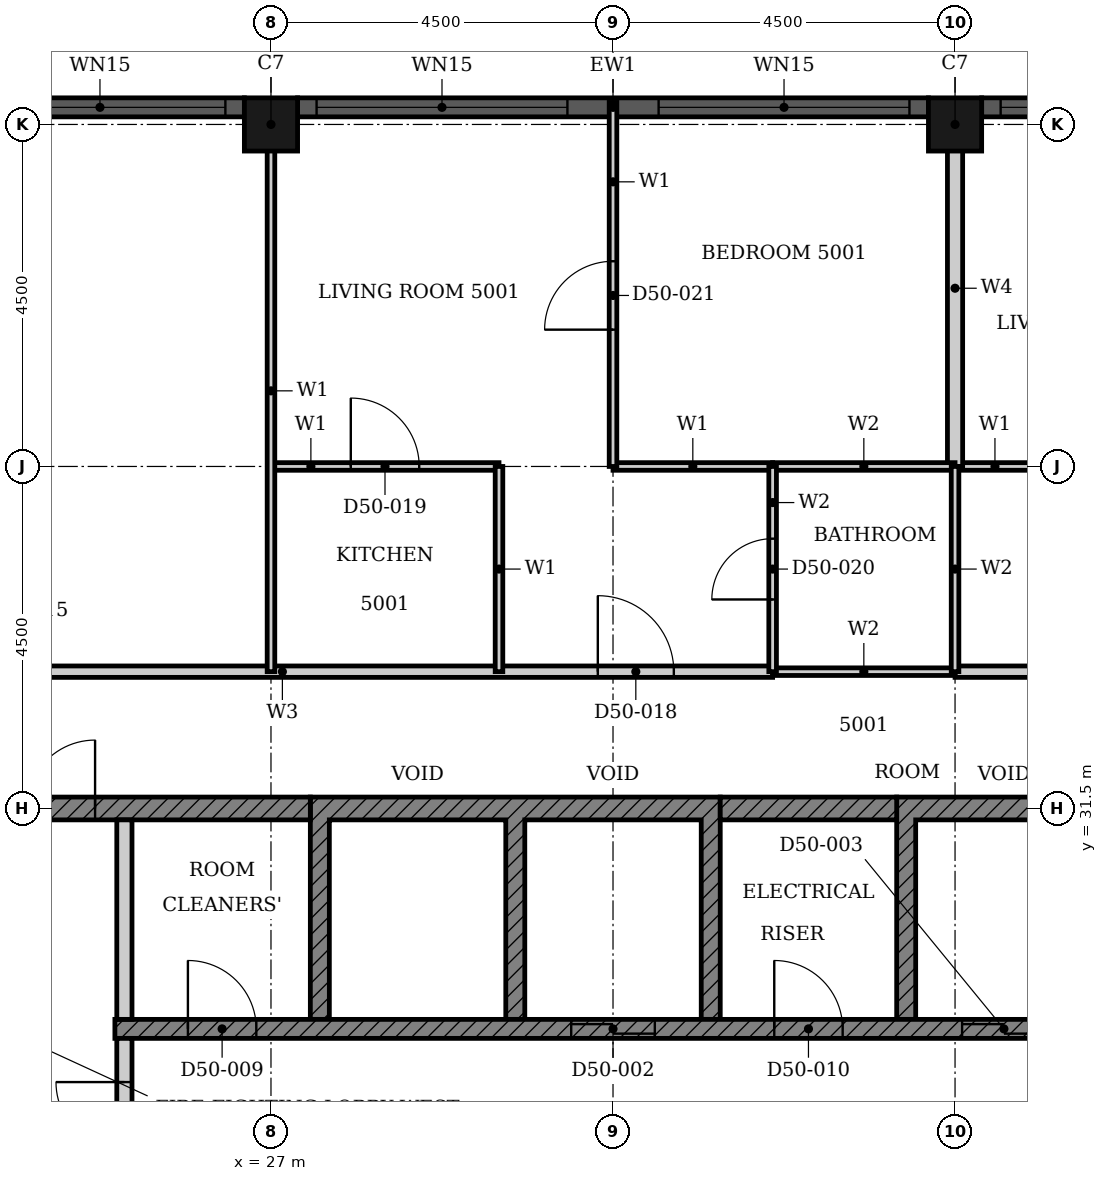
"""IFC4 building model, lengths in metres.
Left out: names, types, materials, properties, quantities, classifications, styles, units other than length and angle.
Written with IfcOpenShell. Run it as: python <this file> out.ifc"""

import sys

from ifc_helpers import new_model, si_unit, direction, frame, frame_2d, origin, origin_2d, place, context, subcontext, project, spatial, polyline, rectangle, hollow_rectangle, outline, extrude, element, fill, save


model = new_model("IFC4")
c1 = context("Model", 3, precision=1e-05, world=origin(), true_north=direction((0.0, 1.0)))
c2 = subcontext(c1, "Body", "Model", "MODEL_VIEW")
j1 = project(units=[si_unit("LENGTHUNIT", "METRE"), si_unit("PLANEANGLEUNIT", "RADIAN")], contexts=[c1])
p1 = place(None, origin())
s1 = spatial("IfcSite", under=j1, at=p1, CompositionType="ELEMENT")
p2 = place(p1, origin())
s2 = spatial("IfcBuilding", under=s1, at=p2, CompositionType="ELEMENT")
p3 = place(p2, frame((0.0, 0.0, 199.8)))
s3 = spatial("IfcBuildingStorey", under=s2, at=p3, CompositionType="ELEMENT", Elevation=199.8)
for number, where, z_axis, x_axis in (
    (1, (36.0, 40.5, 0.0), (0.0, 0.0, 1.0), (1.0, 0.0, 0.0)),
    (2, (27.0, 40.5, 0.0), (0.0, 0.0, 1.0), (1.0, 0.0, 0.0)),
):
    element("IfcColumn", number, at=place(p3, frame(where, z_axis=z_axis, x_axis=x_axis)), inside=s3, PredefinedType="COLUMN", context=c2, shape_type="SweptSolid", body=[
        extrude(hollow_rectangle(XDim=0.7, YDim=0.7, WallThickness=0.022, at=origin_2d()), origin(), (0.0, 0.0, 1.0), 3.7),
    ])
p4 = place(p3, frame((44.65, 40.725, 0.0), z_axis=(0.0, 0.0, 1.0), x_axis=(-1.0, 0.0, 0.0)))
e3 = element("IfcWall", 3, at=p4, inside=s3, PredefinedType="SOLIDWALL", context=c2, shape_type="SweptSolid", body=[
    extrude(rectangle(XDim=8.3, YDim=0.25, at=frame_2d((4.15, 0.0))), origin(), (0.0, 0.0, 1.0), 3.7),
])
p5 = place(p4, frame((0.25, 0.0, 0.45)))
e4 = element("IfcOpeningElement", 4, at=p5, cuts=e3, PredefinedType="OPENING", context=c2, shape_type="SweptSolid", body=[
    extrude(rectangle(XDim=3.3, YDim=2.3, at=frame_2d((1.65, 1.15))), frame((0.0, 0.135, 0.0), z_axis=(0.0, -1.0, 0.0), x_axis=(1.0, 0.0, 0.0)), (0.0, 0.0, 1.0), 0.27),
])
p6 = place(p4, frame((4.75, 0.0, 0.45)))
e5 = element("IfcOpeningElement", 5, at=p6, cuts=e3, PredefinedType="OPENING", context=c2, shape_type="SweptSolid", body=[
    extrude(rectangle(XDim=3.3, YDim=2.3, at=frame_2d((1.65, 1.15))), frame((0.0, 0.135, 0.0), z_axis=(0.0, -1.0, 0.0), x_axis=(1.0, 0.0, 0.0)), (0.0, 0.0, 1.0), 0.27),
])
p7 = place(p3, frame((35.65, 40.725, 0.0), z_axis=(0.0, 0.0, 1.0), x_axis=(-1.0, 0.0, 0.0)))
e6 = element("IfcWall", 6, at=p7, inside=s3, PredefinedType="SOLIDWALL", context=c2, shape_type="SweptSolid", body=[
    extrude(rectangle(XDim=8.3, YDim=0.25, at=frame_2d((4.15, 0.0))), origin(), (0.0, 0.0, 1.0), 3.7),
])
p8 = place(p7, frame((0.25, 0.0, 0.45)))
e7 = element("IfcOpeningElement", 7, at=p8, cuts=e6, PredefinedType="OPENING", context=c2, shape_type="SweptSolid", body=[
    extrude(rectangle(XDim=3.3, YDim=2.3, at=frame_2d((1.65, 1.15))), frame((0.0, 0.135, 0.0), z_axis=(0.0, -1.0, 0.0), x_axis=(1.0, 0.0, 0.0)), (0.0, 0.0, 1.0), 0.27),
])
p9 = place(p7, frame((4.75, 0.0, 0.45)))
e8 = element("IfcOpeningElement", 8, at=p9, cuts=e6, PredefinedType="OPENING", context=c2, shape_type="SweptSolid", body=[
    extrude(rectangle(XDim=3.3, YDim=2.3, at=frame_2d((1.65, 1.15))), frame((0.0, 0.135, 0.0), z_axis=(0.0, -1.0, 0.0), x_axis=(1.0, 0.0, 0.0)), (0.0, 0.0, 1.0), 0.27),
])
p10 = place(p3, frame((26.65, 40.725, 0.0), z_axis=(0.0, 0.0, 1.0), x_axis=(-1.0, 0.0, 0.0)))
e9 = element("IfcWall", 9, at=p10, inside=s3, PredefinedType="SOLIDWALL", context=c2, shape_type="SweptSolid", body=[
    extrude(rectangle(XDim=8.3, YDim=0.25, at=frame_2d((4.15, 0.0))), origin(), (0.0, 0.0, 1.0), 3.7),
])
p11 = place(p10, frame((0.25, 0.0, 0.45)))
e10 = element("IfcOpeningElement", 10, at=p11, cuts=e9, PredefinedType="OPENING", context=c2, shape_type="SweptSolid", body=[
    extrude(rectangle(XDim=3.3, YDim=2.3, at=frame_2d((1.65, 1.15))), frame((0.0, 0.135, 0.0), z_axis=(0.0, -1.0, 0.0), x_axis=(1.0, 0.0, 0.0)), (0.0, 0.0, 1.0), 0.27),
])
p12 = place(p10, frame((4.75, 0.0, 0.45)))
e11 = element("IfcOpeningElement", 11, at=p12, cuts=e9, PredefinedType="OPENING", context=c2, shape_type="SweptSolid", body=[
    extrude(rectangle(XDim=3.3, YDim=2.3, at=frame_2d((1.65, 1.15))), frame((0.0, 0.135, 0.0), z_axis=(0.0, -1.0, 0.0), x_axis=(1.0, 0.0, 0.0)), (0.0, 0.0, 1.0), 0.27),
])
p13 = place(p3, origin())
e12 = element("IfcWall", 12, at=p13, inside=s3, PredefinedType="SHEAR", context=c2, shape_type="SweptSolid", body=[
    extrude(outline(polyline([(27.518, 28.725), (27.768, 28.725), (27.768, 31.35), (30.089, 31.35), (30.089, 28.725), (30.339, 28.725), (30.339, 31.35), (32.661, 31.35), (32.661, 28.725), (32.911, 28.725), (32.911, 31.65), (27.518, 31.65), (27.518, 28.725)])), origin(), (0.0, 0.0, 1.0), 3.4),
])
p14 = place(p3, origin())
e13 = element("IfcWall", 13, at=p14, inside=s3, PredefinedType="SHEAR", context=c2, shape_type="SweptSolid", body=[
    extrude(outline(polyline([(35.232, 28.725), (35.482, 28.725), (35.482, 31.35), (37.803, 31.35), (37.803, 28.725), (38.053, 28.725), (38.053, 31.35), (40.375, 31.35), (40.375, 28.725), (40.625, 28.725), (40.625, 31.65), (35.232, 31.65), (35.232, 28.725)])), origin(), (0.0, 0.0, 1.0), 3.4),
])
p15 = place(p3, frame((18.15, 31.5, 0.0), z_axis=(0.0, 0.0, 1.0), x_axis=(1.0, 0.0, 0.0)))
e14 = element("IfcWall", 14, at=p15, inside=s3, PredefinedType="SHEAR", context=c2, shape_type="SweptSolid", body=[
    extrude(rectangle(XDim=9.368, YDim=0.3, at=frame_2d((4.684, 0.0))), origin(), (0.0, 0.0, 1.0), 3.4),
])
p16 = place(p15, frame((4.736, 0.0, 0.0)))
e15 = element("IfcOpeningElement", 15, at=p16, cuts=e14, PredefinedType="OPENING", context=c2, shape_type="SweptSolid", body=[
    extrude(rectangle(XDim=1.8, YDim=2.1, at=frame_2d((0.9, 1.05))), frame((0.0, 0.16, 0.0), z_axis=(0.0, -1.0, 0.0), x_axis=(1.0, 0.0, 0.0)), (0.0, 0.0, 1.0), 0.32),
])
p17 = place(p3, frame((32.911, 31.5, 0.0), z_axis=(0.0, 0.0, 1.0), x_axis=(1.0, 0.0, 0.0)))
e16 = element("IfcWall", 16, at=p17, inside=s3, PredefinedType="SHEAR", context=c2, shape_type="SweptSolid", body=[
    extrude(rectangle(XDim=2.322, YDim=0.3, at=frame_2d((1.161, 0.0))), origin(), (0.0, 0.0, 1.0), 3.4),
])
p18 = place(p3, frame((24.947, 28.6, 0.0), z_axis=(0.0, 0.0, 1.0), x_axis=(1.0, 0.0, 0.0)))
e17 = element("IfcWall", 17, at=p18, inside=s3, PredefinedType="SHEAR", context=c2, shape_type="SweptSolid", body=[
    extrude(rectangle(XDim=15.678, YDim=0.25, at=frame_2d((7.839, 0.0))), origin(), (0.0, 0.0, 1.0), 3.4),
])
p19 = place(p18, frame((6.004, 0.0, 0.0)))
e18 = element("IfcOpeningElement", 18, at=p19, cuts=e17, PredefinedType="OPENING", context=c2, shape_type="SweptSolid", body=[
    extrude(rectangle(XDim=1.1, YDim=2.1, at=frame_2d((0.55, 1.05))), frame((0.0, 0.135, 0.0), z_axis=(0.0, -1.0, 0.0), x_axis=(1.0, 0.0, 0.0)), (0.0, 0.0, 1.0), 0.27),
])
p20 = place(p18, frame((11.146, 0.0, 0.0)))
e19 = element("IfcOpeningElement", 19, at=p20, cuts=e17, PredefinedType="OPENING", context=c2, shape_type="SweptSolid", body=[
    extrude(rectangle(XDim=1.1, YDim=2.1, at=frame_2d((0.55, 1.05))), frame((0.0, 0.135, 0.0), z_axis=(0.0, -1.0, 0.0), x_axis=(1.0, 0.0, 0.0)), (0.0, 0.0, 1.0), 0.27),
])
p21 = place(p18, frame((13.718, 0.0, 0.0)))
e20 = element("IfcOpeningElement", 20, at=p21, cuts=e17, PredefinedType="OPENING", context=c2, shape_type="SweptSolid", body=[
    extrude(rectangle(XDim=1.1, YDim=2.1, at=frame_2d((0.55, 1.05))), frame((0.0, 0.135, 0.0), z_axis=(0.0, -1.0, 0.0), x_axis=(1.0, 0.0, 0.0)), (0.0, 0.0, 1.0), 0.27),
])
p22 = place(p18, frame((0.961, 0.0, 0.0)))
e21 = element("IfcOpeningElement", 21, at=p22, cuts=e17, PredefinedType="OPENING", context=c2, shape_type="SweptSolid", body=[
    extrude(rectangle(XDim=0.9, YDim=2.1, at=frame_2d((0.45, 1.05))), frame((0.0, 0.135, 0.0), z_axis=(0.0, -1.0, 0.0), x_axis=(1.0, 0.0, 0.0)), (0.0, 0.0, 1.0), 0.27),
])
p23 = place(p18, frame((8.675, 0.0, 0.0)))
e22 = element("IfcOpeningElement", 22, at=p23, cuts=e17, PredefinedType="OPENING", context=c2, shape_type="SweptSolid", body=[
    extrude(rectangle(XDim=0.9, YDim=2.1, at=frame_2d((0.45, 1.05))), frame((0.0, 0.135, 0.0), z_axis=(0.0, -1.0, 0.0), x_axis=(1.0, 0.0, 0.0)), (0.0, 0.0, 1.0), 0.27),
])
p24 = place(p3, frame((25.072, 28.725, 0.0), z_axis=(0.0, 0.0, 1.0), x_axis=(0.0, 1.0, 0.0)))
e23 = element("IfcWall", 23, at=p24, inside=s3, PredefinedType="PARTITIONING", context=c2, shape_type="SweptSolid", body=[
    extrude(rectangle(XDim=2.625, YDim=0.2, at=frame_2d((1.312, 0.0))), origin(), (0.0, 0.0, 1.0), 3.4),
])
p25 = place(p3, frame((25.072, 25.525, 0.0), z_axis=(0.0, 0.0, 1.0), x_axis=(0.0, 1.0, 0.0)))
e24 = element("IfcWall", 24, at=p25, inside=s3, PredefinedType="PARTITIONING", context=c2, shape_type="SweptSolid", body=[
    extrude(rectangle(XDim=2.95, YDim=0.2, at=frame_2d((1.475, 0.0))), origin(), (0.0, 0.0, 1.0), 3.4),
])
p26 = place(p25, frame((0.575, 0.0, 0.0)))
e25 = element("IfcOpeningElement", 25, at=p26, cuts=e24, PredefinedType="OPENING", context=c2, shape_type="SweptSolid", body=[
    extrude(rectangle(XDim=1.8, YDim=2.1, at=frame_2d((0.9, 1.05))), frame((0.0, 0.11, 0.0), z_axis=(0.0, -1.0, 0.0), x_axis=(1.0, 0.0, 0.0)), (0.0, 0.0, 1.0), 0.22),
])
p27 = place(p3, frame((18.0, 33.3, 0.0), z_axis=(0.0, 0.0, 1.0), x_axis=(1.0, 0.0, 0.0)))
e26 = element("IfcWall", 26, at=p27, inside=s3, PredefinedType="PARTITIONING", context=c2, shape_type="SweptSolid", body=[
    extrude(rectangle(XDim=15.6, YDim=0.15, at=frame_2d((7.8, 0.0))), origin(), (0.0, 0.0, 1.0), 3.4),
])
p28 = place(p27, frame((4.0, 0.0, 0.0)))
e27 = element("IfcOpeningElement", 27, at=p28, cuts=e26, PredefinedType="OPENING", context=c2, shape_type="SweptSolid", body=[
    extrude(rectangle(XDim=1.0, YDim=2.1, at=frame_2d((0.5, 1.05))), frame((0.0, 0.085, 0.0), z_axis=(0.0, -1.0, 0.0), x_axis=(1.0, 0.0, 0.0)), (0.0, 0.0, 1.0), 0.17),
])
p29 = place(p27, frame((13.3, 0.0, 0.0)))
e28 = element("IfcOpeningElement", 28, at=p29, cuts=e26, PredefinedType="OPENING", context=c2, shape_type="SweptSolid", body=[
    extrude(rectangle(XDim=1.0, YDim=2.2, at=frame_2d((0.5, 1.1))), frame((0.0, 0.085, 0.0), z_axis=(0.0, -1.0, 0.0), x_axis=(1.0, 0.0, 0.0)), (0.0, 0.0, 1.0), 0.17),
])
p30 = place(p3, frame((36.0, 33.3, 0.0), z_axis=(0.0, 0.0, 1.0), x_axis=(1.0, 0.0, 0.0)))
e29 = element("IfcWall", 29, at=p30, inside=s3, PredefinedType="PARTITIONING", context=c2, shape_type="SweptSolid", body=[
    extrude(rectangle(XDim=6.6, YDim=0.15, at=frame_2d((3.3, 0.0))), origin(), (0.0, 0.0, 1.0), 3.4),
])
p31 = place(p30, frame((4.3, 0.0, 0.0)))
e30 = element("IfcOpeningElement", 30, at=p31, cuts=e29, PredefinedType="OPENING", context=c2, shape_type="SweptSolid", body=[
    extrude(rectangle(XDim=1.0, YDim=2.2, at=frame_2d((0.5, 1.1))), frame((0.0, 0.085, 0.0), z_axis=(0.0, -1.0, 0.0), x_axis=(1.0, 0.0, 0.0)), (0.0, 0.0, 1.0), 0.17),
])
p32 = place(p3, frame((31.5, 36.0, 0.0), z_axis=(0.0, 0.0, 1.0), x_axis=(1.0, 0.0, 0.0)))
e31 = element("IfcWall", 31, at=p32, inside=s3, PredefinedType="PARTITIONING", context=c2, shape_type="SweptSolid", body=[
    extrude(rectangle(XDim=2.1, YDim=0.1, at=frame_2d((1.05, 0.0))), origin(), (0.0, 0.0, 1.0), 3.4),
])
p33 = place(p3, frame((27.0, 36.0, 0.0), z_axis=(0.0, 0.0, 1.0), x_axis=(1.0, 0.0, 0.0)))
e32 = element("IfcWall", 32, at=p33, inside=s3, PredefinedType="PARTITIONING", context=c2, shape_type="SweptSolid", body=[
    extrude(rectangle(XDim=3.0, YDim=0.1, at=frame_2d((1.5, 0.0))), origin(), (0.0, 0.0, 1.0), 3.4),
])
p34 = place(p33, frame((1.05, 0.0, 0.0)))
e33 = element("IfcOpeningElement", 33, at=p34, cuts=e32, PredefinedType="OPENING", context=c2, shape_type="SweptSolid", body=[
    extrude(rectangle(XDim=0.9, YDim=2.1, at=frame_2d((0.45, 1.05))), frame((0.0, 0.06, 0.0), z_axis=(0.0, -1.0, 0.0), x_axis=(1.0, 0.0, 0.0)), (0.0, 0.0, 1.0), 0.12),
])
p35 = place(p3, frame((36.0, 36.0, 0.0), z_axis=(0.0, 0.0, 1.0), x_axis=(1.0, 0.0, 0.0)))
e34 = element("IfcWall", 34, at=p35, inside=s3, PredefinedType="PARTITIONING", context=c2, shape_type="SweptSolid", body=[
    extrude(rectangle(XDim=3.0, YDim=0.1, at=frame_2d((1.5, 0.0))), origin(), (0.0, 0.0, 1.0), 3.4),
])
p36 = place(p35, frame((1.05, 0.0, 0.0)))
e35 = element("IfcOpeningElement", 35, at=p36, cuts=e34, PredefinedType="OPENING", context=c2, shape_type="SweptSolid", body=[
    extrude(rectangle(XDim=0.9, YDim=2.1, at=frame_2d((0.45, 1.05))), frame((0.0, 0.06, 0.0), z_axis=(0.0, -1.0, 0.0), x_axis=(1.0, 0.0, 0.0)), (0.0, 0.0, 1.0), 0.12),
])
p37 = place(p3, frame((27.0, 33.3, 0.0), z_axis=(0.0, 0.0, 1.0), x_axis=(0.0, 1.0, 0.0)))
e36 = element("IfcWall", 36, at=p37, inside=s3, PredefinedType="PARTITIONING", context=c2, shape_type="SweptSolid", body=[
    extrude(rectangle(XDim=7.39, YDim=0.1, at=frame_2d((3.695, 0.0))), origin(), (0.0, 0.0, 1.0), 3.4),
])
p38 = place(p3, frame((30.0, 33.3, 0.0), z_axis=(0.0, 0.0, 1.0), x_axis=(0.0, 1.0, 0.0)))
e37 = element("IfcWall", 37, at=p38, inside=s3, PredefinedType="PARTITIONING", context=c2, shape_type="SweptSolid", body=[
    extrude(rectangle(XDim=2.7, YDim=0.1, at=frame_2d((1.35, 0.0))), origin(), (0.0, 0.0, 1.0), 3.4),
])
p39 = place(p3, frame((31.5, 36.0, 0.0), z_axis=(0.0, 0.0, 1.0), x_axis=(0.0, 1.0, 0.0)))
e38 = element("IfcWall", 38, at=p39, inside=s3, PredefinedType="PARTITIONING", context=c2, shape_type="SweptSolid", body=[
    extrude(rectangle(XDim=4.79, YDim=0.1, at=frame_2d((2.395, 0.0))), origin(), (0.0, 0.0, 1.0), 3.4),
])
p40 = place(p39, frame((1.8, 0.0, 0.0)))
e39 = element("IfcOpeningElement", 39, at=p40, cuts=e38, PredefinedType="OPENING", context=c2, shape_type="SweptSolid", body=[
    extrude(rectangle(XDim=0.9, YDim=2.1, at=frame_2d((0.45, 1.05))), frame((0.0, 0.06, 0.0), z_axis=(0.0, -1.0, 0.0), x_axis=(1.0, 0.0, 0.0)), (0.0, 0.0, 1.0), 0.12),
])
p41 = place(p3, frame((36.0, 36.0, 0.0), z_axis=(0.0, 0.0, 1.0), x_axis=(0.0, 1.0, 0.0)))
e40 = element("IfcWall", 40, at=p41, inside=s3, PredefinedType="PARTITIONING", context=c2, shape_type="SweptSolid", body=[
    extrude(rectangle(XDim=4.69, YDim=0.2, at=frame_2d((2.345, 0.0))), origin(), (0.0, 0.0, 1.0), 3.4),
])
for number, where, z_axis, x_axis in (
    (41, (33.6, 33.3, 0.0), (0.0, 0.0, 1.0), (1.0, 0.0, 0.0)),
    (42, (33.6, 36.0, 0.0), (0.0, 0.0, 1.0), (1.0, 0.0, 0.0)),
):
    element("IfcWall", number, at=place(p3, frame(where, z_axis=z_axis, x_axis=x_axis)), inside=s3, PredefinedType="PARTITIONING", context=c2, shape_type="SweptSolid", body=[
        extrude(rectangle(XDim=2.4, YDim=0.1, at=frame_2d((1.2, 0.0))), origin(), (0.0, 0.0, 1.0), 3.4),
    ])
p42 = place(p3, frame((33.6, 33.3, 0.0), z_axis=(0.0, 0.0, 1.0), x_axis=(0.0, 1.0, 0.0)))
e43 = element("IfcWall", 43, at=p42, inside=s3, PredefinedType="PARTITIONING", context=c2, shape_type="SweptSolid", body=[
    extrude(rectangle(XDim=2.7, YDim=0.1, at=frame_2d((1.35, 0.0))), origin(), (0.0, 0.0, 1.0), 3.4),
])
p43 = place(p42, frame((0.95, 0.0, 0.0)))
e44 = element("IfcOpeningElement", 44, at=p43, cuts=e43, PredefinedType="OPENING", context=c2, shape_type="SweptSolid", body=[
    extrude(rectangle(XDim=0.8, YDim=2.1, at=frame_2d((0.4, 1.05))), frame((0.0, 0.06, 0.0), z_axis=(0.0, -1.0, 0.0), x_axis=(1.0, 0.0, 0.0)), (0.0, 0.0, 1.0), 0.12),
])
p44 = place(p3, frame((36.0, 33.3, 0.0), z_axis=(0.0, 0.0, 1.0), x_axis=(0.0, 1.0, 0.0)))
e45 = element("IfcWall", 45, at=p44, inside=s3, PredefinedType="PARTITIONING", context=c2, shape_type="SweptSolid", body=[
    extrude(rectangle(XDim=2.7, YDim=0.1, at=frame_2d((1.35, 0.0))), origin(), (0.0, 0.0, 1.0), 3.4),
])
p45 = place(p6, origin())
e46 = element("IfcWindow", 46, at=p45, inside=s3, PartitioningType="SINGLE_PANEL", PredefinedType="WINDOW", context=c2, shape_type="SweptSolid", body=[
    extrude(rectangle(XDim=3.3, YDim=2.3, at=frame_2d((1.65, 1.15))), frame((0.0, 0.03, 0.0), z_axis=(0.0, -1.0, 0.0), x_axis=(1.0, 0.0, 0.0)), (0.0, 0.0, 1.0), 0.06),
])
fill(e5, e46)
p46 = place(p8, origin())
e47 = element("IfcWindow", 47, at=p46, inside=s3, PartitioningType="SINGLE_PANEL", PredefinedType="WINDOW", context=c2, shape_type="SweptSolid", body=[
    extrude(rectangle(XDim=3.3, YDim=2.3, at=frame_2d((1.65, 1.15))), frame((0.0, 0.03, 0.0), z_axis=(0.0, -1.0, 0.0), x_axis=(1.0, 0.0, 0.0)), (0.0, 0.0, 1.0), 0.06),
])
fill(e7, e47)
p47 = place(p9, origin())
e48 = element("IfcWindow", 48, at=p47, inside=s3, PartitioningType="SINGLE_PANEL", PredefinedType="WINDOW", context=c2, shape_type="SweptSolid", body=[
    extrude(rectangle(XDim=3.3, YDim=2.3, at=frame_2d((1.65, 1.15))), frame((0.0, 0.03, 0.0), z_axis=(0.0, -1.0, 0.0), x_axis=(1.0, 0.0, 0.0)), (0.0, 0.0, 1.0), 0.06),
])
fill(e8, e48)
p48 = place(p11, origin())
e49 = element("IfcWindow", 49, at=p48, inside=s3, PartitioningType="SINGLE_PANEL", PredefinedType="WINDOW", context=c2, shape_type="SweptSolid", body=[
    extrude(rectangle(XDim=3.3, YDim=2.3, at=frame_2d((1.65, 1.15))), frame((0.0, 0.03, 0.0), z_axis=(0.0, -1.0, 0.0), x_axis=(1.0, 0.0, 0.0)), (0.0, 0.0, 1.0), 0.06),
])
fill(e10, e49)
p49 = place(p19, origin())
e50 = element("IfcDoor", 50, at=p49, inside=s3, OperationType="DOUBLE_DOOR_SLIDING", PredefinedType="DOOR", context=c2, shape_type="SweptSolid", body=[
    extrude(rectangle(XDim=1.1, YDim=2.1, at=frame_2d((0.55, 1.05))), frame((0.0, 0.025, 0.0), z_axis=(0.0, -1.0, 0.0), x_axis=(1.0, 0.0, 0.0)), (0.0, 0.0, 1.0), 0.05),
])
fill(e18, e50)
p50 = place(p20, origin())
e51 = element("IfcDoor", 51, at=p50, inside=s3, OperationType="DOUBLE_DOOR_SLIDING", PredefinedType="DOOR", context=c2, shape_type="SweptSolid", body=[
    extrude(rectangle(XDim=1.1, YDim=2.1, at=frame_2d((0.55, 1.05))), frame((0.0, 0.025, 0.0), z_axis=(0.0, -1.0, 0.0), x_axis=(1.0, 0.0, 0.0)), (0.0, 0.0, 1.0), 0.05),
])
fill(e19, e51)
p51 = place(p22, origin())
e52 = element("IfcDoor", 52, at=p51, inside=s3, OperationType="SINGLE_SWING_LEFT", PredefinedType="DOOR", context=c2, shape_type="SweptSolid", body=[
    extrude(rectangle(XDim=0.9, YDim=2.1, at=frame_2d((0.45, 1.05))), frame((0.0, 0.025, 0.0), z_axis=(0.0, -1.0, 0.0), x_axis=(1.0, 0.0, 0.0)), (0.0, 0.0, 1.0), 0.05),
])
fill(e21, e52)
p52 = place(p23, origin())
e53 = element("IfcDoor", 53, at=p52, inside=s3, OperationType="SINGLE_SWING_LEFT", PredefinedType="DOOR", context=c2, shape_type="SweptSolid", body=[
    extrude(rectangle(XDim=0.9, YDim=2.1, at=frame_2d((0.45, 1.05))), frame((0.0, 0.025, 0.0), z_axis=(0.0, -1.0, 0.0), x_axis=(1.0, 0.0, 0.0)), (0.0, 0.0, 1.0), 0.05),
])
fill(e22, e53)
p53 = place(p26, origin())
e54 = element("IfcDoor", 54, at=p53, inside=s3, OperationType="DOUBLE_DOOR_SINGLE_SWING", PredefinedType="DOOR", context=c2, shape_type="SweptSolid", body=[
    extrude(rectangle(XDim=1.8, YDim=2.1, at=frame_2d((0.9, 1.05))), frame((0.0, 0.025, 0.0), z_axis=(0.0, -1.0, 0.0), x_axis=(1.0, 0.0, 0.0)), (0.0, 0.0, 1.0), 0.05),
])
fill(e25, e54)
p54 = place(p16, origin())
e55 = element("IfcDoor", 55, at=p54, inside=s3, OperationType="DOUBLE_DOOR_SINGLE_SWING", PredefinedType="DOOR", context=c2, shape_type="SweptSolid", body=[
    extrude(rectangle(XDim=1.8, YDim=2.1, at=frame_2d((0.9, 1.05))), frame((0.0, 0.025, 0.0), z_axis=(0.0, -1.0, 0.0), x_axis=(1.0, 0.0, 0.0)), (0.0, 0.0, 1.0), 0.05),
])
fill(e15, e55)
p55 = place(p29, origin())
e56 = element("IfcDoor", 56, at=p55, inside=s3, OperationType="SINGLE_SWING_RIGHT", PredefinedType="DOOR", context=c2, shape_type="SweptSolid", body=[
    extrude(rectangle(XDim=1.0, YDim=2.2, at=frame_2d((0.5, 1.1))), frame((0.0, 0.025, 0.0), z_axis=(0.0, -1.0, 0.0), x_axis=(1.0, 0.0, 0.0)), (0.0, 0.0, 1.0), 0.05),
])
fill(e28, e56)
p56 = place(p34, origin())
e57 = element("IfcDoor", 57, at=p56, inside=s3, OperationType="SINGLE_SWING_LEFT", PredefinedType="DOOR", context=c2, shape_type="SweptSolid", body=[
    extrude(rectangle(XDim=0.9, YDim=2.1, at=frame_2d((0.45, 1.05))), frame((0.0, 0.025, 0.0), z_axis=(0.0, -1.0, 0.0), x_axis=(1.0, 0.0, 0.0)), (0.0, 0.0, 1.0), 0.05),
])
fill(e33, e57)
p57 = place(p43, origin())
e58 = element("IfcDoor", 58, at=p57, inside=s3, OperationType="SINGLE_SWING_LEFT", PredefinedType="DOOR", context=c2, shape_type="SweptSolid", body=[
    extrude(rectangle(XDim=0.8, YDim=2.1, at=frame_2d((0.4, 1.05))), frame((0.0, 0.025, 0.0), z_axis=(0.0, -1.0, 0.0), x_axis=(1.0, 0.0, 0.0)), (0.0, 0.0, 1.0), 0.05),
])
fill(e44, e58)
p58 = place(p40, origin())
e59 = element("IfcDoor", 59, at=p58, inside=s3, OperationType="SINGLE_SWING_LEFT", PredefinedType="DOOR", context=c2, shape_type="SweptSolid", body=[
    extrude(rectangle(XDim=0.9, YDim=2.1, at=frame_2d((0.45, 1.05))), frame((0.0, 0.025, 0.0), z_axis=(0.0, -1.0, 0.0), x_axis=(1.0, 0.0, 0.0)), (0.0, 0.0, 1.0), 0.05),
])
fill(e39, e59)
save(model, sys.argv[1])
